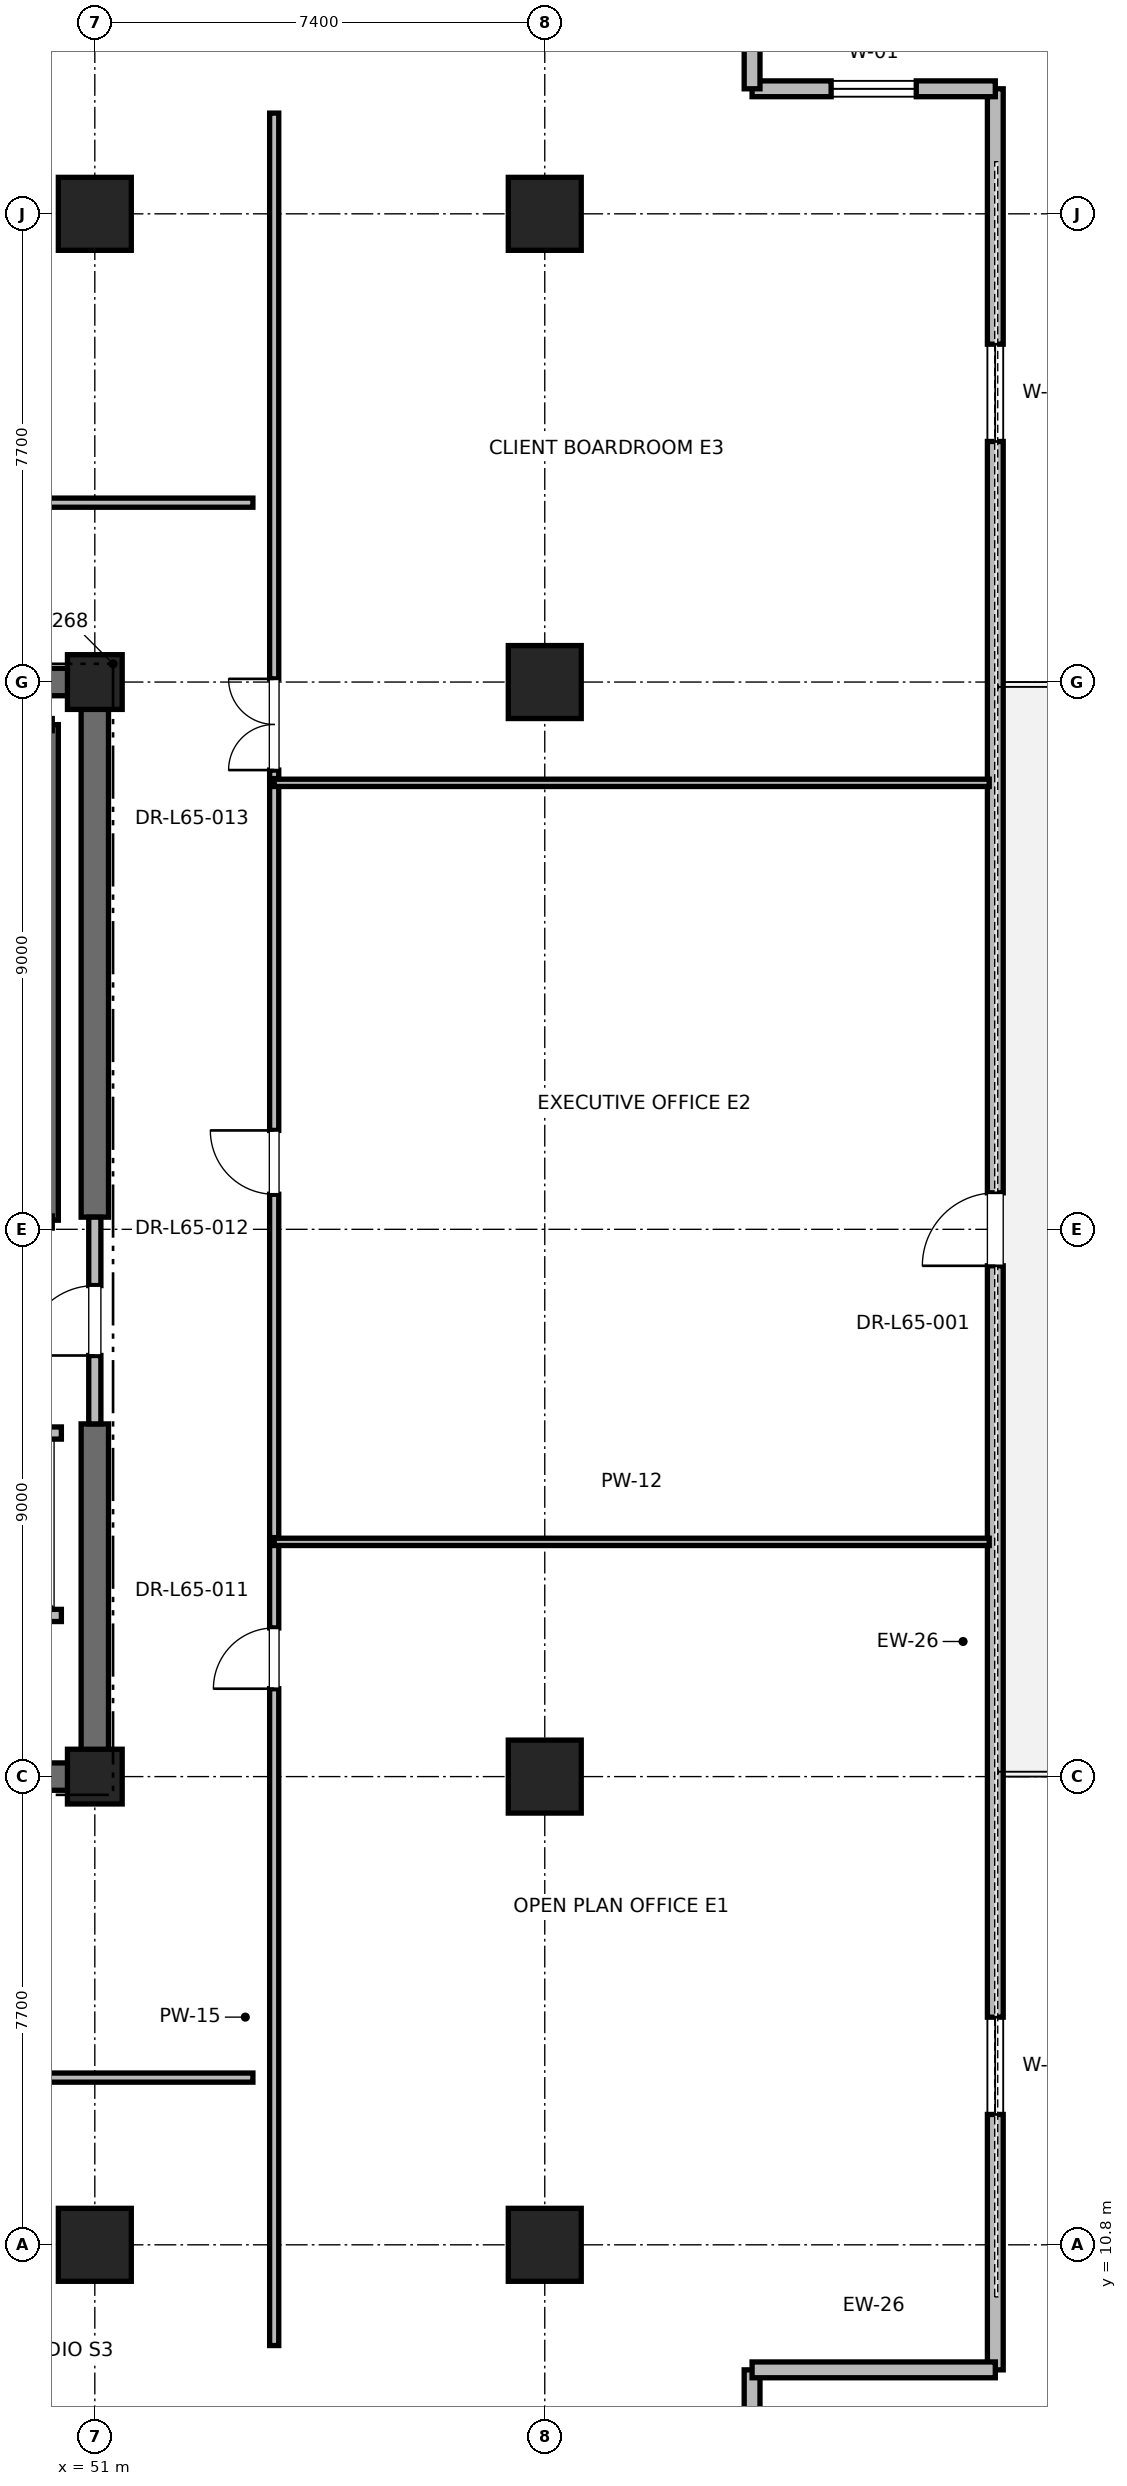
"""IFC4 building model, lengths in metres.
Left out: names, types, materials, properties, quantities, classifications, styles, units other than length and angle.
Written with IfcOpenShell. Run it as: python <this file> out.ifc"""

import sys

from ifc_helpers import new_model, si_unit, direction, frame, frame_2d, origin, origin_2d, place, context, subcontext, project, spatial, rectangle, extrude, element, fill, save


model = new_model("IFC4")
c1 = context("Model", 3, precision=1e-05, world=origin(), true_north=direction((0.0, 1.0)))
c2 = subcontext(c1, "Body", "Model", "MODEL_VIEW")
j1 = project(units=[si_unit("LENGTHUNIT", "METRE"), si_unit("PLANEANGLEUNIT", "RADIAN")], contexts=[c1])
p1 = place(None, origin())
s1 = spatial("IfcSite", under=j1, at=p1, CompositionType="ELEMENT")
p2 = place(p1, origin())
s2 = spatial("IfcBuilding", under=s1, at=p2, CompositionType="ELEMENT")
p3 = place(p2, frame((0.0, 0.0, 279.2)))
s3 = spatial("IfcBuildingStorey", under=s2, at=p3, CompositionType="ELEMENT", Elevation=279.2)
for number, where, z_axis, x_axis in (
    (1, (51.0, 10.8, 0.0), (0.0, 0.0, 1.0), (1.0, 0.0, 0.0)),
    (2, (51.0, 44.2, 0.0), (0.0, 0.0, 1.0), (1.0, 0.0, 0.0)),
    (3, (58.4, 18.5, 0.0), (0.0, 0.0, 1.0), (1.0, 0.0, 0.0)),
    (4, (58.4, 36.5, 0.0), (0.0, 0.0, 1.0), (1.0, 0.0, 0.0)),
    (5, (58.4, 10.8, 0.0), (0.0, 0.0, 1.0), (1.0, 0.0, 0.0)),
    (6, (58.4, 44.2, 0.0), (0.0, 0.0, 1.0), (1.0, 0.0, 0.0)),
):
    element("IfcColumn", number, at=place(p3, frame(where, z_axis=z_axis, x_axis=x_axis)), inside=s3, PredefinedType="COLUMN", context=c2, shape_type="SweptSolid", body=[
        extrude(rectangle(XDim=1.2, YDim=1.2, at=origin_2d()), origin(), (0.0, 0.0, 1.0), 4.0),
    ])
for number, where, z_axis, x_axis in (
    (7, (51.0, 18.5, 0.0), (0.0, 0.0, 1.0), (1.0, 0.0, 0.0)),
    (8, (51.0, 36.5, 0.0), (0.0, 0.0, 1.0), (1.0, 0.0, 0.0)),
):
    element("IfcColumn", number, at=place(p3, frame(where, z_axis=z_axis, x_axis=x_axis)), inside=s3, PredefinedType="PILASTER", context=c2, shape_type="SweptSolid", body=[
        extrude(rectangle(XDim=0.9, YDim=0.9, at=origin_2d()), origin(), (0.0, 0.0, 1.0), 4.0),
    ])
p4 = place(p3, frame((41.8, 18.5, 0.0), z_axis=(0.0, 0.0, 1.0), x_axis=(1.0, 0.0, 0.0)))
e9 = element("IfcWall", 9, at=p4, inside=s3, PredefinedType="SHEAR", context=c2, shape_type="SweptSolid", body=[
    extrude(rectangle(XDim=9.2, YDim=0.45, at=frame_2d((4.6, 0.0))), origin(), (0.0, 0.0, 1.0), 3.785),
])
for number, where, z_axis, x_axis in (
    (10, (45.2, 36.5, 0.0), (0.0, 0.0, 1.0), (1.0, 0.0, 0.0)),
    (11, (51.0, 18.5, 0.0), (0.0, 0.0, 1.0), (0.0, 1.0, 0.0)),
):
    element("IfcWall", number, at=place(p3, frame(where, z_axis=z_axis, x_axis=x_axis)), inside=s3, PredefinedType="SHEAR", context=c2, shape_type="SweptSolid", body=[
        extrude(rectangle(XDim=5.8, YDim=0.45, at=frame_2d((2.9, 0.0))), origin(), (0.0, 0.0, 1.0), 3.785),
    ])
p5 = place(p3, frame((51.0, 27.7, 0.0), z_axis=(0.0, 0.0, 1.0), x_axis=(0.0, 1.0, 0.0)))
e12 = element("IfcWall", 12, at=p5, inside=s3, PredefinedType="SHEAR", context=c2, shape_type="SweptSolid", body=[
    extrude(rectangle(XDim=8.8, YDim=0.45, at=frame_2d((4.4, 0.0))), origin(), (0.0, 0.0, 1.0), 3.785),
])
p6 = place(p3, frame((65.81, 8.744, 0.0), z_axis=(0.0, 0.0, 1.0), x_axis=(0.0, 1.0, 0.0)))
e13 = element("IfcWall", 13, at=p6, inside=s3, PredefinedType="PARAPET", context=c2, shape_type="SweptSolid", body=[
    extrude(rectangle(XDim=37.513, YDim=0.26, at=frame_2d((18.756, 0.0))), origin(), (0.0, 0.0, 1.0), 3.123),
])
p7 = place(p6, frame((4.2, 0.0, 0.85)))
e14 = element("IfcOpeningElement", 14, at=p7, cuts=e13, PredefinedType="OPENING", context=c2, shape_type="SweptSolid", body=[
    extrude(rectangle(XDim=1.6, YDim=2.1, at=frame_2d((0.8, 1.05))), frame((0.0, 0.13, 0.0), z_axis=(0.0, -1.0, 0.0), x_axis=(1.0, 0.0, 0.0)), (0.0, 0.0, 1.0), 0.26),
])
p8 = place(p6, frame((18.156, 0.0, 0.0)))
e15 = element("IfcOpeningElement", 15, at=p8, cuts=e13, PredefinedType="OPENING", context=c2, shape_type="SweptSolid", body=[
    extrude(rectangle(XDim=1.2, YDim=2.2, at=frame_2d((0.6, 1.1))), frame((0.0, 0.13, 0.0), z_axis=(0.0, -1.0, 0.0), x_axis=(1.0, 0.0, 0.0)), (0.0, 0.0, 1.0), 0.26),
])
p9 = place(p6, frame((31.713, 0.0, 0.85)))
e16 = element("IfcOpeningElement", 16, at=p9, cuts=e13, PredefinedType="OPENING", context=c2, shape_type="SweptSolid", body=[
    extrude(rectangle(XDim=1.6, YDim=2.1, at=frame_2d((0.8, 1.05))), frame((0.0, 0.13, 0.0), z_axis=(0.0, -1.0, 0.0), x_axis=(1.0, 0.0, 0.0)), (0.0, 0.0, 1.0), 0.26),
])
p10 = place(p3, frame((61.81, 5.244, 0.0), z_axis=(0.0, 0.0, 1.0), x_axis=(0.0, 1.0, 0.0)))
e17 = element("IfcWall", 17, at=p10, inside=s3, PredefinedType="PARAPET", context=c2, shape_type="SweptSolid", body=[
    extrude(rectangle(XDim=3.5, YDim=0.26, at=frame_2d((1.75, 0.0))), origin(), (0.0, 0.0, 1.0), 3.785),
])
p11 = place(p10, frame((1.05, 0.0, 0.85)))
e18 = element("IfcOpeningElement", 18, at=p11, cuts=e17, PredefinedType="OPENING", context=c2, shape_type="SweptSolid", body=[
    extrude(rectangle(XDim=1.4, YDim=2.0, at=frame_2d((0.7, 1.0))), frame((0.0, 0.13, 0.0), z_axis=(0.0, -1.0, 0.0), x_axis=(1.0, 0.0, 0.0)), (0.0, 0.0, 1.0), 0.26),
])
p12 = place(p3, frame((61.81, 8.744, 0.0), z_axis=(0.0, 0.0, 1.0), x_axis=(1.0, 0.0, 0.0)))
e19 = element("IfcWall", 19, at=p12, inside=s3, PredefinedType="PARAPET", context=c2, shape_type="SweptSolid", body=[
    extrude(rectangle(XDim=4.0, YDim=0.26, at=frame_2d((2.0, 0.0))), origin(), (0.0, 0.0, 1.0), 3.785),
])
p13 = place(p3, frame((65.81, 46.256, 0.0), z_axis=(0.0, 0.0, 1.0), x_axis=(-1.0, 0.0, 0.0)))
e20 = element("IfcWall", 20, at=p13, inside=s3, PredefinedType="PARAPET", context=c2, shape_type="SweptSolid", body=[
    extrude(rectangle(XDim=4.0, YDim=0.26, at=frame_2d((2.0, 0.0))), origin(), (0.0, 0.0, 1.0), 3.785),
])
p14 = place(p13, frame((1.3, 0.0, 0.85)))
e21 = element("IfcOpeningElement", 21, at=p14, cuts=e20, PredefinedType="OPENING", context=c2, shape_type="SweptSolid", body=[
    extrude(rectangle(XDim=1.4, YDim=2.0, at=frame_2d((0.7, 1.0))), frame((0.0, 0.13, 0.0), z_axis=(0.0, -1.0, 0.0), x_axis=(1.0, 0.0, 0.0)), (0.0, 0.0, 1.0), 0.26),
])
p15 = place(p3, frame((61.81, 46.256, 0.0), z_axis=(0.0, 0.0, 1.0), x_axis=(0.0, 1.0, 0.0)))
e22 = element("IfcWall", 22, at=p15, inside=s3, PredefinedType="PARAPET", context=c2, shape_type="SweptSolid", body=[
    extrude(rectangle(XDim=3.5, YDim=0.26, at=frame_2d((1.75, 0.0))), origin(), (0.0, 0.0, 1.0), 3.785),
])
p16 = place(p3, frame((50.3, 27.65, 0.0), z_axis=(0.0, 0.0, 1.0), x_axis=(0.0, 1.0, 0.0)))
e23 = element("IfcWall", 23, at=p16, inside=s3, PredefinedType="SOLIDWALL", context=c2, shape_type="SweptSolid", body=[
    extrude(rectangle(XDim=8.15, YDim=0.2, at=frame_2d((4.075, 0.0))), origin(), (0.0, 0.0, 1.0), 3.785),
])
p17 = place(p3, frame((51.0, 24.3, 0.0), z_axis=(0.0, 0.0, 1.0), x_axis=(0.0, 1.0, 0.0)))
e24 = element("IfcWall", 24, at=p17, inside=s3, PredefinedType="PARTITIONING", context=c2, shape_type="SweptSolid", body=[
    extrude(rectangle(XDim=3.4, YDim=0.2, at=frame_2d((1.7, 0.0))), origin(), (0.0, 0.0, 1.0), 2.865),
])
p18 = place(p17, frame((1.125, 0.0, 0.0)))
e25 = element("IfcOpeningElement", 25, at=p18, cuts=e24, PredefinedType="OPENING", context=c2, shape_type="SweptSolid", body=[
    extrude(rectangle(XDim=1.15, YDim=2.2, at=frame_2d((0.575, 1.1))), frame((0.0, 0.1, 0.0), z_axis=(0.0, -1.0, 0.0), x_axis=(1.0, 0.0, 0.0)), (0.0, 0.0, 1.0), 0.2),
])
p19 = place(p3, frame((47.85, 21.15, 0.0), z_axis=(0.0, 0.0, 1.0), x_axis=(1.0, 0.0, 0.0)))
e26 = element("IfcWall", 26, at=p19, inside=s3, PredefinedType="SOLIDWALL", context=c2, shape_type="SweptSolid", body=[
    extrude(rectangle(XDim=2.6, YDim=0.2, at=frame_2d((1.3, 0.0))), origin(), (0.0, 0.0, 1.0), 3.785),
])
p20 = place(p3, frame((50.45, 24.15, 0.0), z_axis=(0.0, 0.0, 1.0), x_axis=(-1.0, 0.0, 0.0)))
e27 = element("IfcWall", 27, at=p20, inside=s3, PredefinedType="SOLIDWALL", context=c2, shape_type="SweptSolid", body=[
    extrude(rectangle(XDim=2.6, YDim=0.2, at=frame_2d((1.3, 0.0))), origin(), (0.0, 0.0, 1.0), 2.865),
])
p21 = place(p20, frame((0.75, 0.0, 0.0)))
e28 = element("IfcOpeningElement", 28, at=p21, cuts=e27, PredefinedType="OPENING", context=c2, shape_type="SweptSolid", body=[
    extrude(rectangle(XDim=1.1, YDim=2.2, at=frame_2d((0.55, 1.1))), frame((0.0, 0.1, 0.0), z_axis=(0.0, -1.0, 0.0), x_axis=(1.0, 0.0, 0.0)), (0.0, 0.0, 1.0), 0.2),
])
p22 = place(p3, frame((37.894, 39.45, 0.0), z_axis=(0.0, 0.0, 1.0), x_axis=(1.0, 0.0, 0.0)))
e29 = element("IfcWall", 29, at=p22, inside=s3, PredefinedType="PARTITIONING", context=c2, shape_type="SweptSolid", body=[
    extrude(rectangle(XDim=15.706, YDim=0.15, at=frame_2d((7.853, 0.0))), origin(), (0.0, 0.0, 1.0), 2.85),
])
p23 = place(p22, frame((7.278, 0.0, 0.0)))
e30 = element("IfcOpeningElement", 30, at=p23, cuts=e29, PredefinedType="OPENING", context=c2, shape_type="SweptSolid", body=[
    extrude(rectangle(XDim=1.05, YDim=2.2, at=frame_2d((0.525, 1.1))), frame((0.0, 0.075, 0.0), z_axis=(0.0, -1.0, 0.0), x_axis=(1.0, 0.0, 0.0)), (0.0, 0.0, 1.0), 0.15),
])
p24 = place(p3, frame((44.15, 13.55, 0.0), z_axis=(0.0, 0.0, 1.0), x_axis=(1.0, 0.0, 0.0)))
e31 = element("IfcWall", 31, at=p24, inside=s3, PredefinedType="PARTITIONING", context=c2, shape_type="SweptSolid", body=[
    extrude(rectangle(XDim=9.45, YDim=0.15, at=frame_2d((4.725, 0.0))), origin(), (0.0, 0.0, 1.0), 2.85),
])
p25 = place(p24, frame((4.175, 0.0, 0.0)))
e32 = element("IfcOpeningElement", 32, at=p25, cuts=e31, PredefinedType="OPENING", context=c2, shape_type="SweptSolid", body=[
    extrude(rectangle(XDim=1.0, YDim=2.15, at=frame_2d((0.5, 1.075))), frame((0.0, 0.075, 0.0), z_axis=(0.0, -1.0, 0.0), x_axis=(1.0, 0.0, 0.0)), (0.0, 0.0, 1.0), 0.15),
])
p26 = place(p3, frame((53.95, 9.144, 0.0), z_axis=(0.0, 0.0, 1.0), x_axis=(0.0, 1.0, 0.0)))
e33 = element("IfcWall", 33, at=p26, inside=s3, PredefinedType="PARTITIONING", context=c2, shape_type="SweptSolid", body=[
    extrude(rectangle(XDim=13.216, YDim=0.15, at=frame_2d((6.608, 0.0))), origin(), (0.0, 0.0, 1.0), 2.85),
])
p27 = place(p26, frame((10.802, 0.0, 0.0)))
e34 = element("IfcOpeningElement", 34, at=p27, cuts=e33, PredefinedType="OPENING", context=c2, shape_type="SweptSolid", body=[
    extrude(rectangle(XDim=1.0, YDim=2.15, at=frame_2d((0.5, 1.075))), frame((0.0, 0.075, 0.0), z_axis=(0.0, -1.0, 0.0), x_axis=(1.0, 0.0, 0.0)), (0.0, 0.0, 1.0), 0.15),
])
p28 = place(p3, frame((53.95, 22.36, 0.0), z_axis=(0.0, 0.0, 1.0), x_axis=(1.0, 0.0, 0.0)))
e35 = element("IfcWall", 35, at=p28, inside=s3, PredefinedType="PARTITIONING", context=c2, shape_type="SweptSolid", body=[
    extrude(rectangle(XDim=11.76, YDim=0.12, at=frame_2d((5.88, 0.0))), origin(), (0.0, 0.0, 1.0), 2.85),
])
p29 = place(p3, frame((53.95, 22.43, 0.0), z_axis=(0.0, 0.0, 1.0), x_axis=(0.0, 1.0, 0.0)))
e36 = element("IfcWall", 36, at=p29, inside=s3, PredefinedType="PARTITIONING", context=c2, shape_type="SweptSolid", body=[
    extrude(rectangle(XDim=12.412, YDim=0.15, at=frame_2d((6.206, 0.0))), origin(), (0.0, 0.0, 1.0), 2.85),
])
p30 = place(p29, frame((5.646, 0.0, 0.0)))
e37 = element("IfcOpeningElement", 37, at=p30, cuts=e36, PredefinedType="OPENING", context=c2, shape_type="SweptSolid", body=[
    extrude(rectangle(XDim=1.05, YDim=2.2, at=frame_2d((0.525, 1.1))), frame((0.0, 0.075, 0.0), z_axis=(0.0, -1.0, 0.0), x_axis=(1.0, 0.0, 0.0)), (0.0, 0.0, 1.0), 0.15),
])
p31 = place(p3, frame((53.95, 34.843, 0.0), z_axis=(0.0, 0.0, 1.0), x_axis=(1.0, 0.0, 0.0)))
e38 = element("IfcWall", 38, at=p31, inside=s3, PredefinedType="PARTITIONING", context=c2, shape_type="SweptSolid", body=[
    extrude(rectangle(XDim=11.76, YDim=0.12, at=frame_2d((5.88, 0.0))), origin(), (0.0, 0.0, 1.0), 2.85),
])
p32 = place(p3, frame((53.95, 34.913, 0.0), z_axis=(0.0, 0.0, 1.0), x_axis=(0.0, 1.0, 0.0)))
e39 = element("IfcWall", 39, at=p32, inside=s3, PredefinedType="PARTITIONING", context=c2, shape_type="SweptSolid", body=[
    extrude(rectangle(XDim=10.944, YDim=0.15, at=frame_2d((5.472, 0.0))), origin(), (0.0, 0.0, 1.0), 2.85),
])
p33 = place(p32, frame((0.14, 0.0, 0.0)))
e40 = element("IfcOpeningElement", 40, at=p33, cuts=e39, PredefinedType="OPENING", context=c2, shape_type="SweptSolid", body=[
    extrude(rectangle(XDim=1.5, YDim=2.25, at=frame_2d((0.75, 1.125))), frame((0.0, 0.075, 0.0), z_axis=(0.0, -1.0, 0.0), x_axis=(1.0, 0.0, 0.0)), (0.0, 0.0, 1.0), 0.15),
])
p34 = place(p7, origin())
e41 = element("IfcWindow", 41, at=p34, inside=s3, PartitioningType="SINGLE_PANEL", PredefinedType="WINDOW", context=c2, shape_type="SweptSolid", body=[
    extrude(rectangle(XDim=1.6, YDim=2.1, at=frame_2d((0.8, 1.05))), frame((0.0, 0.03, 0.0), z_axis=(0.0, -1.0, 0.0), x_axis=(1.0, 0.0, 0.0)), (0.0, 0.0, 1.0), 0.06),
])
fill(e14, e41)
p35 = place(p8, origin())
e42 = element("IfcDoor", 42, at=p35, inside=s3, OperationType="SINGLE_SWING_LEFT", PredefinedType="DOOR", context=c2, shape_type="SweptSolid", body=[
    extrude(rectangle(XDim=1.2, YDim=2.2, at=frame_2d((0.6, 1.1))), frame((0.0, 0.025, 0.0), z_axis=(0.0, -1.0, 0.0), x_axis=(1.0, 0.0, 0.0)), (0.0, 0.0, 1.0), 0.05),
])
fill(e15, e42)
p36 = place(p9, origin())
e43 = element("IfcWindow", 43, at=p36, inside=s3, PartitioningType="SINGLE_PANEL", PredefinedType="WINDOW", context=c2, shape_type="SweptSolid", body=[
    extrude(rectangle(XDim=1.6, YDim=2.1, at=frame_2d((0.8, 1.05))), frame((0.0, 0.03, 0.0), z_axis=(0.0, -1.0, 0.0), x_axis=(1.0, 0.0, 0.0)), (0.0, 0.0, 1.0), 0.06),
])
fill(e16, e43)
p37 = place(p14, origin())
e44 = element("IfcWindow", 44, at=p37, inside=s3, PartitioningType="SINGLE_PANEL", PredefinedType="WINDOW", context=c2, shape_type="SweptSolid", body=[
    extrude(rectangle(XDim=1.4, YDim=2.0, at=frame_2d((0.7, 1.0))), frame((0.0, 0.03, 0.0), z_axis=(0.0, -1.0, 0.0), x_axis=(1.0, 0.0, 0.0)), (0.0, 0.0, 1.0), 0.06),
])
fill(e21, e44)
p38 = place(p18, origin())
e45 = element("IfcDoor", 45, at=p38, inside=s3, OperationType="SINGLE_SWING_LEFT", PredefinedType="DOOR", context=c2, shape_type="SweptSolid", body=[
    extrude(rectangle(XDim=1.15, YDim=2.2, at=frame_2d((0.575, 1.1))), frame((0.0, 0.025, 0.0), z_axis=(0.0, -1.0, 0.0), x_axis=(1.0, 0.0, 0.0)), (0.0, 0.0, 1.0), 0.05),
])
fill(e25, e45)
p39 = place(p27, origin())
e46 = element("IfcDoor", 46, at=p39, inside=s3, OperationType="SINGLE_SWING_LEFT", PredefinedType="DOOR", context=c2, shape_type="SweptSolid", body=[
    extrude(rectangle(XDim=1.0, YDim=2.15, at=frame_2d((0.5, 1.075))), frame((0.0, 0.025, 0.0), z_axis=(0.0, -1.0, 0.0), x_axis=(1.0, 0.0, 0.0)), (0.0, 0.0, 1.0), 0.05),
])
fill(e34, e46)
p40 = place(p30, origin())
e47 = element("IfcDoor", 47, at=p40, inside=s3, OperationType="SINGLE_SWING_RIGHT", PredefinedType="DOOR", context=c2, shape_type="SweptSolid", body=[
    extrude(rectangle(XDim=1.05, YDim=2.2, at=frame_2d((0.525, 1.1))), frame((0.0, 0.025, 0.0), z_axis=(0.0, -1.0, 0.0), x_axis=(1.0, 0.0, 0.0)), (0.0, 0.0, 1.0), 0.05),
])
fill(e37, e47)
p41 = place(p33, origin())
e48 = element("IfcDoor", 48, at=p41, inside=s3, OperationType="DOUBLE_DOOR_SINGLE_SWING", PredefinedType="DOOR", context=c2, shape_type="SweptSolid", body=[
    extrude(rectangle(XDim=1.5, YDim=2.25, at=frame_2d((0.75, 1.125))), frame((0.0, 0.025, 0.0), z_axis=(0.0, -1.0, 0.0), x_axis=(1.0, 0.0, 0.0)), (0.0, 0.0, 1.0), 0.05),
])
fill(e40, e48)
save(model, sys.argv[1])
